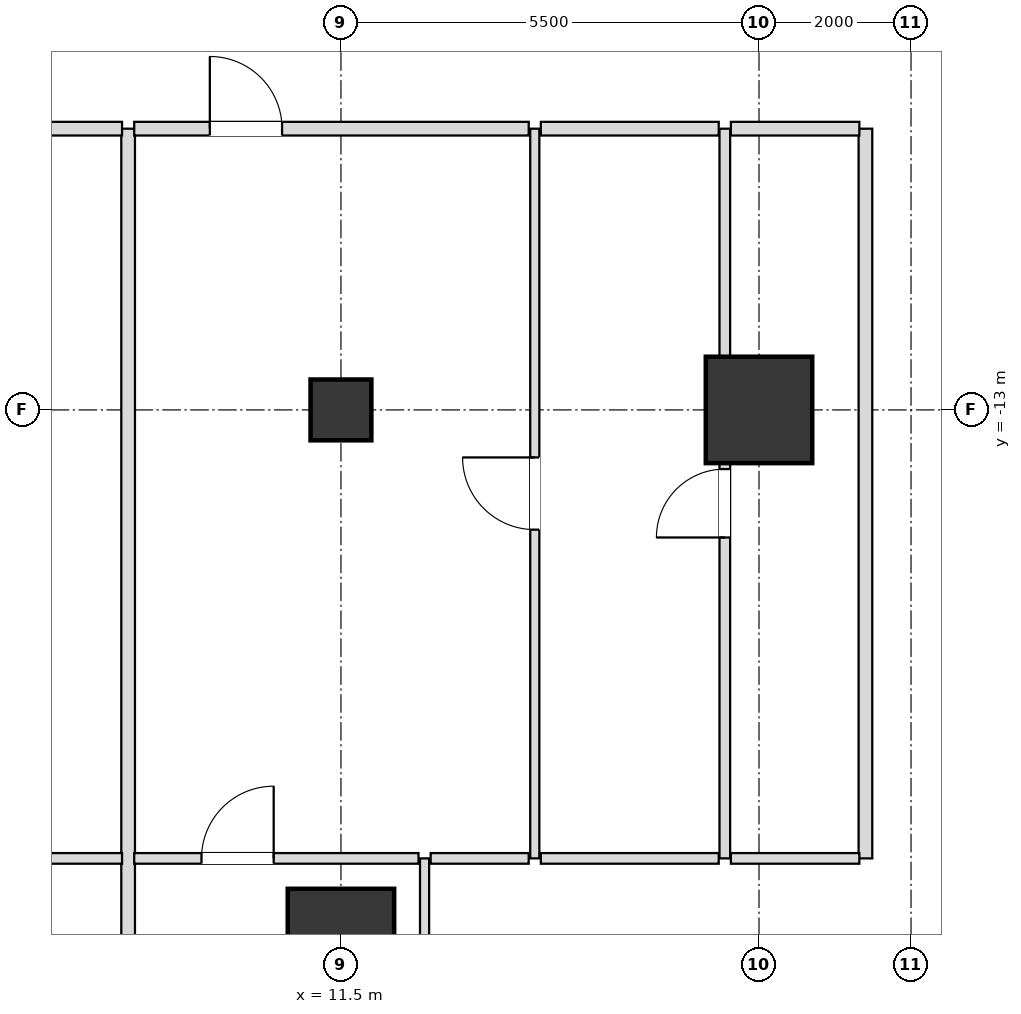
"""IFC4 building model, lengths in metres.
Left out: names, types, materials, properties, quantities, classifications, styles, units other than length and angle.
Written with IfcOpenShell. Run it as: python <this file> out.ifc"""

import sys

from ifc_helpers import new_model, si_unit, direction, frame, frame_2d, origin, origin_2d, place, context, subcontext, project, spatial, rectangle, extrude, element, fill, save


model = new_model("IFC4")
c1 = context("Model", 3, precision=1e-05, world=origin(), true_north=direction((0.0, 1.0)))
c2 = subcontext(c1, "Body", "Model", "MODEL_VIEW")
j1 = project(units=[si_unit("LENGTHUNIT", "METRE"), si_unit("PLANEANGLEUNIT", "RADIAN")], contexts=[c1])
p1 = place(None, origin())
s1 = spatial("IfcSite", under=j1, at=p1, CompositionType="ELEMENT")
p2 = place(p1, origin())
s2 = spatial("IfcBuilding", under=s1, at=p2, CompositionType="ELEMENT")
p3 = place(p2, frame((0.0, 0.0, 39.6)))
s3 = spatial("IfcBuildingStorey", under=s2, at=p3, CompositionType="ELEMENT", Elevation=39.6)
for number, where, z_axis, x_axis in (
    (1, (11.5, -20.0, 0.0), (0.0, 0.0, 1.0), (1.0, 0.0, 0.0)),
    (2, (17.0, -13.0, 0.0), (0.0, 0.0, 1.0), (1.0, 0.0, 0.0)),
):
    element("IfcColumn", number, at=place(p3, frame(where, z_axis=z_axis, x_axis=x_axis)), inside=s3, PredefinedType="USERDEFINED", context=c2, shape_type="SweptSolid", body=[
        extrude(rectangle(XDim=1.4, YDim=1.4, at=origin_2d()), origin(), (0.0, 0.0, 1.0), 3.6),
    ])
p4 = place(p3, frame((11.5, -13.0, 0.0), z_axis=(0.0, 0.0, 1.0), x_axis=(1.0, 0.0, 0.0)))
e3 = element("IfcColumn", 3, at=p4, inside=s3, PredefinedType="COLUMN", context=c2, shape_type="SweptSolid", body=[
    extrude(rectangle(XDim=0.8, YDim=0.8, at=origin_2d()), origin(), (0.0, 0.0, 1.0), 3.6),
])
p5 = place(p3, frame((8.7, -24.9, 0.0), z_axis=(0.0, 0.0, 1.0), x_axis=(0.0, 1.0, 0.0)))
e4 = element("IfcWall", 4, at=p5, inside=s3, PredefinedType="PARTITIONING", context=c2, shape_type="SweptSolid", body=[
    extrude(rectangle(XDim=15.6, YDim=0.18, at=frame_2d((7.8, 0.0))), origin(), (0.0, 0.0, 1.0), 2.816),
])
p6 = place(p3, frame((12.6, -24.9, 0.0), z_axis=(0.0, 0.0, 1.0), x_axis=(0.0, 1.0, 0.0)))
e5 = element("IfcWall", 5, at=p6, inside=s3, PredefinedType="PARTITIONING", context=c2, shape_type="SweptSolid", body=[
    extrude(rectangle(XDim=6.0, YDim=0.12, at=frame_2d((3.0, 0.0))), origin(), (0.0, 0.0, 1.0), 2.736),
])
p7 = place(p6, frame((2.55, 0.0, 0.0)))
e6 = element("IfcOpeningElement", 6, at=p7, cuts=e5, PredefinedType="OPENING", context=c2, shape_type="SweptSolid", body=[
    extrude(rectangle(XDim=0.9, YDim=2.1, at=frame_2d((0.45, 1.05))), frame((0.0, 0.07, 0.0), z_axis=(0.0, -1.0, 0.0), x_axis=(1.0, 0.0, 0.0)), (0.0, 0.0, 1.0), 0.14),
])
p8 = place(p3, frame((14.05, -18.9, 0.0), z_axis=(0.0, 0.0, 1.0), x_axis=(0.0, 1.0, 0.0)))
e7 = element("IfcWall", 7, at=p8, inside=s3, PredefinedType="PARTITIONING", context=c2, shape_type="SweptSolid", body=[
    extrude(rectangle(XDim=9.6, YDim=0.12, at=frame_2d((4.8, 0.0))), origin(), (0.0, 0.0, 1.0), 2.736),
])
p9 = place(p8, frame((4.325, 0.0, 0.0)))
e8 = element("IfcOpeningElement", 8, at=p9, cuts=e7, PredefinedType="OPENING", context=c2, shape_type="SweptSolid", body=[
    extrude(rectangle(XDim=0.95, YDim=2.1, at=frame_2d((0.475, 1.05))), frame((0.0, 0.07, 0.0), z_axis=(0.0, -1.0, 0.0), x_axis=(1.0, 0.0, 0.0)), (0.0, 0.0, 1.0), 0.14),
])
p10 = place(p3, frame((16.55, -18.9, 0.0), z_axis=(0.0, 0.0, 1.0), x_axis=(0.0, 1.0, 0.0)))
e9 = element("IfcWall", 9, at=p10, inside=s3, PredefinedType="PARTITIONING", context=c2, shape_type="SweptSolid", body=[
    extrude(rectangle(XDim=9.6, YDim=0.14, at=frame_2d((4.8, 0.0))), origin(), (0.0, 0.0, 1.0), 2.736),
])
p11 = place(p10, frame((4.222, 0.0, 0.0)))
e10 = element("IfcOpeningElement", 10, at=p11, cuts=e9, PredefinedType="OPENING", context=c2, shape_type="SweptSolid", body=[
    extrude(rectangle(XDim=0.9, YDim=2.1, at=frame_2d((0.45, 1.05))), frame((0.0, 0.08, 0.0), z_axis=(0.0, -1.0, 0.0), x_axis=(1.0, 0.0, 0.0)), (0.0, 0.0, 1.0), 0.16),
])
p12 = place(p3, frame((18.4, -18.9, 0.0), z_axis=(0.0, 0.0, 1.0), x_axis=(0.0, 1.0, 0.0)))
e11 = element("IfcWall", 11, at=p12, inside=s3, PredefinedType="PARTITIONING", context=c2, shape_type="SweptSolid", body=[
    extrude(rectangle(XDim=9.6, YDim=0.18, at=frame_2d((4.8, 0.0))), origin(), (0.0, 0.0, 1.0), 2.736),
])
p13 = place(p3, frame((5.83, -18.9, 0.0), z_axis=(0.0, 0.0, 1.0), x_axis=(1.0, 0.0, 0.0)))
e12 = element("IfcWall", 12, at=p13, inside=s3, PredefinedType="PARTITIONING", context=c2, shape_type="SweptSolid", body=[
    extrude(rectangle(XDim=2.79, YDim=0.14, at=frame_2d((1.395, 0.0))), origin(), (0.0, 0.0, 1.0), 2.816),
])
p14 = place(p3, frame((8.78, -18.9, 0.0), z_axis=(0.0, 0.0, 1.0), x_axis=(1.0, 0.0, 0.0)))
e13 = element("IfcWall", 13, at=p14, inside=s3, PredefinedType="PARTITIONING", context=c2, shape_type="SweptSolid", body=[
    extrude(rectangle(XDim=3.74, YDim=0.14, at=frame_2d((1.87, 0.0))), origin(), (0.0, 0.0, 1.0), 2.736),
])
p15 = place(p14, frame((0.885, 0.0, 0.0)))
e14 = element("IfcOpeningElement", 14, at=p15, cuts=e13, PredefinedType="OPENING", context=c2, shape_type="SweptSolid", body=[
    extrude(rectangle(XDim=0.95, YDim=2.1, at=frame_2d((0.475, 1.05))), frame((0.0, 0.08, 0.0), z_axis=(0.0, -1.0, 0.0), x_axis=(1.0, 0.0, 0.0)), (0.0, 0.0, 1.0), 0.16),
])
p16 = place(p3, frame((12.68, -18.9, 0.0), z_axis=(0.0, 0.0, 1.0), x_axis=(1.0, 0.0, 0.0)))
e15 = element("IfcWall", 15, at=p16, inside=s3, PredefinedType="PARTITIONING", context=c2, shape_type="SweptSolid", body=[
    extrude(rectangle(XDim=1.29, YDim=0.14, at=frame_2d((0.645, 0.0))), origin(), (0.0, 0.0, 1.0), 2.736),
])
p17 = place(p3, frame((14.13, -18.9, 0.0), z_axis=(0.0, 0.0, 1.0), x_axis=(1.0, 0.0, 0.0)))
e16 = element("IfcWall", 16, at=p17, inside=s3, PredefinedType="PARTITIONING", context=c2, shape_type="SweptSolid", body=[
    extrude(rectangle(XDim=2.34, YDim=0.14, at=frame_2d((1.17, 0.0))), origin(), (0.0, 0.0, 1.0), 2.736),
])
p18 = place(p3, frame((16.63, -18.9, 0.0), z_axis=(0.0, 0.0, 1.0), x_axis=(1.0, 0.0, 0.0)))
e17 = element("IfcWall", 17, at=p18, inside=s3, PredefinedType="PARTITIONING", context=c2, shape_type="SweptSolid", body=[
    extrude(rectangle(XDim=1.69, YDim=0.14, at=frame_2d((0.845, 0.0))), origin(), (0.0, 0.0, 1.0), 2.736),
])
p19 = place(p3, frame((5.83, -9.3, 0.0), z_axis=(0.0, 0.0, 1.0), x_axis=(1.0, 0.0, 0.0)))
e18 = element("IfcWall", 18, at=p19, inside=s3, PredefinedType="PARTITIONING", context=c2, shape_type="SweptSolid", body=[
    extrude(rectangle(XDim=2.79, YDim=0.18, at=frame_2d((1.395, 0.0))), origin(), (0.0, 0.0, 1.0), 2.816),
])
p20 = place(p3, frame((8.78, -9.3, 0.0), z_axis=(0.0, 0.0, 1.0), x_axis=(1.0, 0.0, 0.0)))
e19 = element("IfcWall", 19, at=p20, inside=s3, PredefinedType="PARTITIONING", context=c2, shape_type="SweptSolid", body=[
    extrude(rectangle(XDim=5.19, YDim=0.18, at=frame_2d((2.595, 0.0))), origin(), (0.0, 0.0, 1.0), 3.38),
])
p21 = place(p20, frame((0.995, 0.0, 0.0)))
e20 = element("IfcOpeningElement", 20, at=p21, cuts=e19, PredefinedType="OPENING", context=c2, shape_type="SweptSolid", body=[
    extrude(rectangle(XDim=0.95, YDim=2.15, at=frame_2d((0.475, 1.075))), frame((0.0, 0.1, 0.0), z_axis=(0.0, -1.0, 0.0), x_axis=(1.0, 0.0, 0.0)), (0.0, 0.0, 1.0), 0.2),
])
p22 = place(p3, frame((14.13, -9.3, 0.0), z_axis=(0.0, 0.0, 1.0), x_axis=(1.0, 0.0, 0.0)))
e21 = element("IfcWall", 21, at=p22, inside=s3, PredefinedType="PARTITIONING", context=c2, shape_type="SweptSolid", body=[
    extrude(rectangle(XDim=2.34, YDim=0.18, at=frame_2d((1.17, 0.0))), origin(), (0.0, 0.0, 1.0), 3.38),
])
p23 = place(p3, frame((16.63, -9.3, 0.0), z_axis=(0.0, 0.0, 1.0), x_axis=(1.0, 0.0, 0.0)))
e22 = element("IfcWall", 22, at=p23, inside=s3, PredefinedType="PARTITIONING", context=c2, shape_type="SweptSolid", body=[
    extrude(rectangle(XDim=1.69, YDim=0.18, at=frame_2d((0.845, 0.0))), origin(), (0.0, 0.0, 1.0), 2.816),
])
p24 = place(p21, origin())
e23 = element("IfcDoor", 23, at=p24, inside=s3, OperationType="SINGLE_SWING_LEFT", PredefinedType="DOOR", context=c2, shape_type="SweptSolid", body=[
    extrude(rectangle(XDim=0.95, YDim=2.15, at=frame_2d((0.475, 1.075))), frame((0.0, 0.025, 0.0), z_axis=(0.0, -1.0, 0.0), x_axis=(1.0, 0.0, 0.0)), (0.0, 0.0, 1.0), 0.05),
])
fill(e20, e23)
p25 = place(p9, origin())
e24 = element("IfcDoor", 24, at=p25, inside=s3, OperationType="SINGLE_SWING_RIGHT", PredefinedType="DOOR", context=c2, shape_type="SweptSolid", body=[
    extrude(rectangle(XDim=0.95, YDim=2.1, at=frame_2d((0.475, 1.05))), frame((0.0, 0.025, 0.0), z_axis=(0.0, -1.0, 0.0), x_axis=(1.0, 0.0, 0.0)), (0.0, 0.0, 1.0), 0.05),
])
fill(e8, e24)
p26 = place(p11, origin())
e25 = element("IfcDoor", 25, at=p26, inside=s3, OperationType="SINGLE_SWING_LEFT", PredefinedType="DOOR", context=c2, shape_type="SweptSolid", body=[
    extrude(rectangle(XDim=0.9, YDim=2.1, at=frame_2d((0.45, 1.05))), frame((0.0, 0.025, 0.0), z_axis=(0.0, -1.0, 0.0), x_axis=(1.0, 0.0, 0.0)), (0.0, 0.0, 1.0), 0.05),
])
fill(e10, e25)
p27 = place(p15, origin())
e26 = element("IfcDoor", 26, at=p27, inside=s3, OperationType="SINGLE_SWING_RIGHT", PredefinedType="DOOR", context=c2, shape_type="SweptSolid", body=[
    extrude(rectangle(XDim=0.95, YDim=2.1, at=frame_2d((0.475, 1.05))), frame((0.0, 0.025, 0.0), z_axis=(0.0, -1.0, 0.0), x_axis=(1.0, 0.0, 0.0)), (0.0, 0.0, 1.0), 0.05),
])
fill(e14, e26)
save(model, sys.argv[1])
